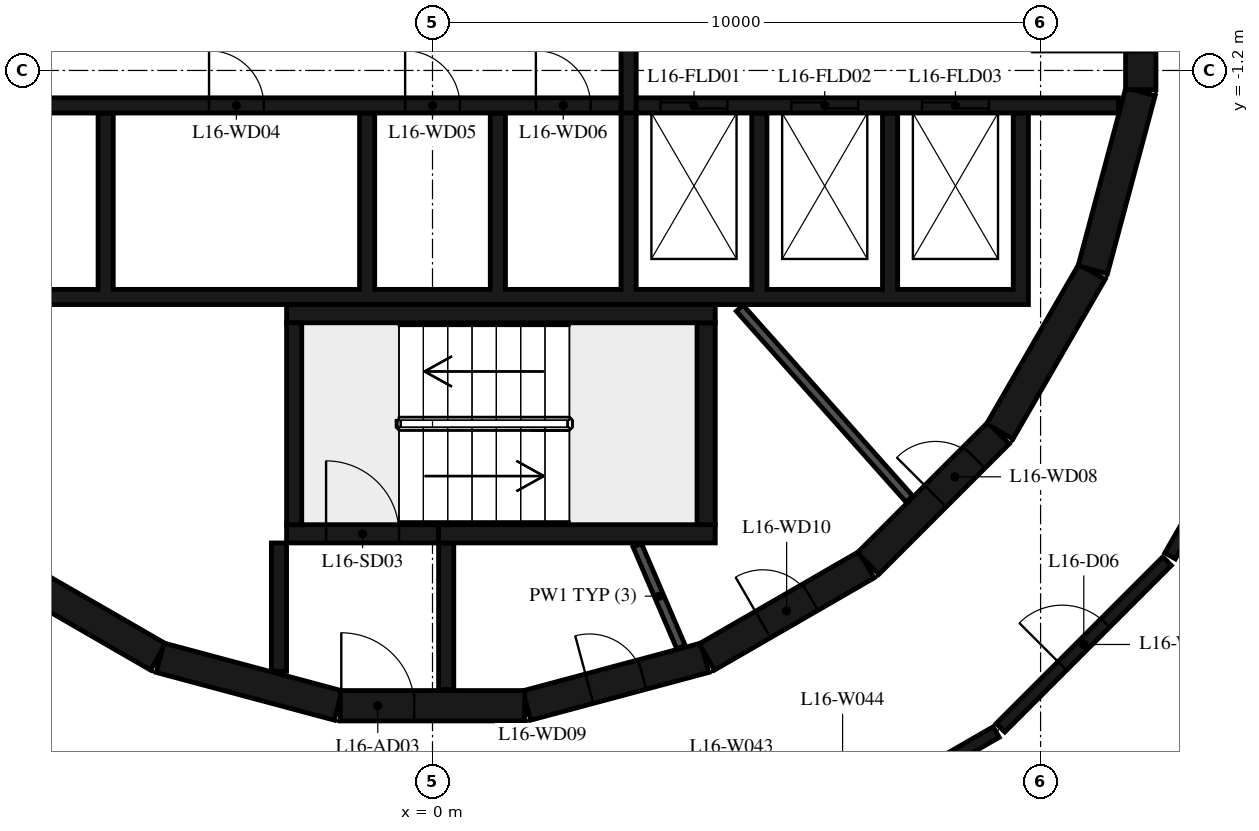
"""IFC4 building model, lengths in metres.
Left out: names, types, materials, properties, quantities, classifications, styles, units other than length and angle.
Written with IfcOpenShell. Run it as: python <this file> out.ifc"""

import sys

from ifc_helpers import new_model, si_unit, direction, frame, frame_2d, origin, place, context, subcontext, project, spatial, polyline, rectangle, outline, extrude, element, fill, save


model = new_model("IFC4")
c1 = context("Model", 3, precision=1e-05, world=origin(), true_north=direction((0.0, 1.0)))
c2 = subcontext(c1, "Body", "Model", "MODEL_VIEW")
j1 = project(units=[si_unit("LENGTHUNIT", "METRE"), si_unit("PLANEANGLEUNIT", "RADIAN")], contexts=[c1])
p1 = place(None, origin())
s1 = spatial("IfcSite", under=j1, at=p1, CompositionType="ELEMENT")
p2 = place(p1, origin())
s2 = spatial("IfcBuilding", under=s1, at=p2, CompositionType="ELEMENT")
p3 = place(p2, frame((0.0, 0.0, 69.9)))
s3 = spatial("IfcBuildingStorey", under=s2, at=p3, CompositionType="ELEMENT", Elevation=69.9)
p4 = place(p3, frame((1.55, -11.643, 0.0), z_axis=(0.0, 0.0, 1.0), x_axis=(0.965948410781, 0.258734743916, 0.0)))
e1 = element("IfcWall", 1, at=p4, inside=s3, PredefinedType="SHEAR", context=c2, shape_type="SweptSolid", body=[
    extrude(rectangle(XDim=3.033, YDim=0.5, at=frame_2d((1.516, 0.0))), origin(), (0.0, 0.0, 1.0), 6.35),
])
p5 = place(p4, frame((1.066, 0.0, 0.0)))
e2 = element("IfcOpeningElement", 2, at=p5, cuts=e1, PredefinedType="OPENING", context=c2, shape_type="SweptSolid", body=[
    extrude(rectangle(XDim=0.9, YDim=2.1, at=frame_2d((0.45, 1.05))), frame((0.0, 0.26, 0.0), z_axis=(0.0, -1.0, 0.0), x_axis=(1.0, 0.0, 0.0)), (0.0, 0.0, 1.0), 0.52),
])
p6 = place(p3, frame((4.51, -10.845, 0.0), z_axis=(0.0, 0.0, 1.0), x_axis=(0.865975092491, 0.500087131594, 0.0)))
e3 = element("IfcWall", 3, at=p6, inside=s3, PredefinedType="SHEAR", context=c2, shape_type="SweptSolid", body=[
    extrude(rectangle(XDim=3.033, YDim=0.5, at=frame_2d((1.516, 0.0))), origin(), (0.0, 0.0, 1.0), 6.35),
])
p7 = place(p6, frame((1.066, 0.0, 0.0)))
e4 = element("IfcOpeningElement", 4, at=p7, cuts=e3, PredefinedType="OPENING", context=c2, shape_type="SweptSolid", body=[
    extrude(rectangle(XDim=0.9, YDim=2.1, at=frame_2d((0.45, 1.05))), frame((0.0, 0.26, 0.0), z_axis=(0.0, -1.0, 0.0), x_axis=(1.0, 0.0, 0.0)), (0.0, 0.0, 1.0), 0.52),
])
p8 = place(p3, frame((7.164, -9.308, 0.0), z_axis=(0.0, 0.0, 1.0), x_axis=(0.707106781187, 0.707106781187, 0.0)))
e5 = element("IfcWall", 5, at=p8, inside=s3, PredefinedType="SHEAR", context=c2, shape_type="SweptSolid", body=[
    extrude(rectangle(XDim=3.032, YDim=0.5, at=frame_2d((1.516, 0.0))), origin(), (0.0, 0.0, 1.0), 6.35),
])
p9 = place(p8, frame((1.566, 0.0, 0.0)))
e6 = element("IfcOpeningElement", 6, at=p9, cuts=e5, PredefinedType="OPENING", context=c2, shape_type="SweptSolid", body=[
    extrude(rectangle(XDim=0.9, YDim=2.1, at=frame_2d((0.45, 1.05))), frame((0.0, 0.26, 0.0), z_axis=(0.0, -1.0, 0.0), x_axis=(1.0, 0.0, 0.0)), (0.0, 0.0, 1.0), 0.52),
])
for number, where, z_axis, x_axis in (
    (7, (9.329, -7.137, 0.0), (0.0, 0.0, 1.0), (0.5, 0.866, 0.0)),
    (8, (10.858, -4.479, 0.0), (0.0, 0.0, 1.0), (0.259, 0.966, 0.0)),
):
    element("IfcWall", number, at=place(p3, frame(where, z_axis=z_axis, x_axis=x_axis)), inside=s3, PredefinedType="SHEAR", context=c2, shape_type="SweptSolid", body=[
        extrude(rectangle(XDim=3.033, YDim=0.5, at=frame_2d((1.516, 0.0))), origin(), (0.0, 0.0, 1.0), 6.35),
    ])
p10 = place(p3, frame((11.647, -1.516, 0.0), z_axis=(0.0, 0.0, 1.0), x_axis=(0.0, 1.0, 0.0)))
e9 = element("IfcWall", 9, at=p10, inside=s3, PredefinedType="SHEAR", context=c2, shape_type="SweptSolid", body=[
    extrude(rectangle(XDim=3.033, YDim=0.5, at=frame_2d((1.516, 0.0))), origin(), (0.0, 0.0, 1.0), 6.35),
])
p11 = place(p10, frame((0.616, 0.0, 0.0)))
e10 = element("IfcOpeningElement", 10, at=p11, cuts=e9, PredefinedType="OPENING", context=c2, shape_type="SweptSolid", body=[
    extrude(rectangle(XDim=1.8, YDim=2.1, at=frame_2d((0.9, 1.05))), frame((0.0, 0.26, 0.0), z_axis=(0.0, -1.0, 0.0), x_axis=(1.0, 0.0, 0.0)), (0.0, 0.0, 1.0), 0.52),
])
for number, where, z_axis, x_axis in (
    (11, (-7.137, -9.329, 0.0), (0.0, 0.0, 1.0), (0.866, -0.5, 0.0)),
    (12, (-4.479, -10.858, 0.0), (0.0, 0.0, 1.0), (0.966, -0.259, 0.0)),
):
    element("IfcWall", number, at=place(p3, frame(where, z_axis=z_axis, x_axis=x_axis)), inside=s3, PredefinedType="SHEAR", context=c2, shape_type="SweptSolid", body=[
        extrude(rectangle(XDim=3.033, YDim=0.5, at=frame_2d((1.516, 0.0))), origin(), (0.0, 0.0, 1.0), 6.35),
    ])
p12 = place(p3, frame((-1.516, -11.647, 0.0), z_axis=(0.0, 0.0, 1.0), x_axis=(1.0, 0.0, 0.0)))
e13 = element("IfcWall", 13, at=p12, inside=s3, PredefinedType="SHEAR", context=c2, shape_type="SweptSolid", body=[
    extrude(rectangle(XDim=3.033, YDim=0.5, at=frame_2d((1.516, 0.0))), origin(), (0.0, 0.0, 1.0), 6.35),
])
p13 = place(p12, frame((0.016, 0.0, 0.0)))
e14 = element("IfcOpeningElement", 14, at=p13, cuts=e13, PredefinedType="OPENING", context=c2, shape_type="SweptSolid", body=[
    extrude(rectangle(XDim=1.2, YDim=2.1, at=frame_2d((0.6, 1.05))), frame((0.0, 0.26, 0.0), z_axis=(0.0, -1.0, 0.0), x_axis=(1.0, 0.0, 0.0)), (0.0, 0.0, 1.0), 0.52),
])
p14 = place(p3, frame((-2.275, -8.67, 0.0), z_axis=(0.0, 0.0, 1.0), x_axis=(0.0, 1.0, 0.0)))
e15 = element("IfcWall", 15, at=p14, inside=s3, PredefinedType="SHEAR", context=c2, shape_type="SweptSolid", body=[
    extrude(rectangle(XDim=3.32, YDim=0.25, at=frame_2d((1.66, 0.0))), origin(), (0.0, 0.0, 1.0), 6.35),
])
p15 = place(p3, frame((-2.4, -5.2, 0.0), z_axis=(0.0, 0.0, 1.0), x_axis=(1.0, 0.0, 0.0)))
e16 = element("IfcWall", 16, at=p15, inside=s3, PredefinedType="SHEAR", context=c2, shape_type="SweptSolid", body=[
    extrude(rectangle(XDim=7.05, YDim=0.3, at=frame_2d((3.525, 0.0))), origin(), (0.0, 0.0, 1.0), 6.35),
])
p16 = place(p3, frame((4.5, -8.67, 0.0), z_axis=(0.0, 0.0, 1.0), x_axis=(0.0, 1.0, 0.0)))
e17 = element("IfcWall", 17, at=p16, inside=s3, PredefinedType="SHEAR", context=c2, shape_type="SweptSolid", body=[
    extrude(rectangle(XDim=3.32, YDim=0.3, at=frame_2d((1.66, 0.0))), origin(), (0.0, 0.0, 1.0), 6.35),
])
p17 = place(p3, frame((0.1, -8.82, 0.0), z_axis=(0.0, 0.0, 1.0), x_axis=(1.0, 0.0, 0.0)))
e18 = element("IfcWall", 18, at=p17, inside=s3, PredefinedType="SHEAR", context=c2, shape_type="SweptSolid", body=[
    extrude(rectangle(XDim=4.55, YDim=0.3, at=frame_2d((2.275, 0.0))), origin(), (0.0, 0.0, 1.0), 6.35),
])
p18 = place(p3, frame((-2.4, -8.82, 0.0), z_axis=(0.0, 0.0, 1.0), x_axis=(1.0, 0.0, 0.0)))
e19 = element("IfcWall", 19, at=p18, inside=s3, PredefinedType="SHEAR", context=c2, shape_type="SweptSolid", body=[
    extrude(rectangle(XDim=2.5, YDim=0.3, at=frame_2d((1.25, 0.0))), origin(), (0.0, 0.0, 1.0), 6.35),
])
p19 = place(p18, frame((0.65, 0.0, 0.0)))
e20 = element("IfcOpeningElement", 20, at=p19, cuts=e19, PredefinedType="OPENING", context=c2, shape_type="SweptSolid", body=[
    extrude(rectangle(XDim=1.2, YDim=2.1, at=frame_2d((0.6, 1.05))), frame((0.0, 0.16, 0.0), z_axis=(0.0, -1.0, 0.0), x_axis=(1.0, 0.0, 0.0)), (0.0, 0.0, 1.0), 0.32),
])
p20 = place(p3, frame((-2.525, -8.97, 0.0), z_axis=(0.0, 0.0, 1.0), x_axis=(0.0, -1.0, 0.0)))
e21 = element("IfcWall", 21, at=p20, inside=s3, PredefinedType="SHEAR", context=c2, shape_type="SweptSolid", body=[
    extrude(rectangle(XDim=2.11, YDim=0.25, at=frame_2d((1.055, 0.0))), origin(), (0.0, 0.0, 1.0), 6.35),
])
p21 = place(p3, frame((0.225, -8.97, 0.0), z_axis=(0.0, 0.0, 1.0), x_axis=(0.0, -1.0, 0.0)))
e22 = element("IfcWall", 22, at=p21, inside=s3, PredefinedType="SHEAR", context=c2, shape_type="SweptSolid", body=[
    extrude(rectangle(XDim=2.41, YDim=0.25, at=frame_2d((1.205, 0.0))), origin(), (0.0, 0.0, 1.0), 6.35),
])
p22 = place(p3, origin())
e23 = element("IfcWall", 23, at=p22, inside=s3, PredefinedType="SHEAR", context=c2, shape_type="SweptSolid", body=[
    extrude(outline(polyline([(9.8, -5.05), (9.8, -4.8), (9.8, -1.9), (9.55, -1.9), (9.55, -4.8), (7.65, -4.8), (7.65, -1.9), (7.4, -1.9), (7.4, -4.8), (5.5, -4.8), (5.5, -1.9), (5.25, -1.9), (5.25, -4.8), (3.35, -4.8), (3.35, -1.9), (3.1, -1.9), (3.1, -4.8), (1.2, -4.8), (1.2, -1.9), (0.95, -1.9), (0.95, -4.8), (-0.95, -4.8), (-0.95, -1.9), (-1.2, -1.9), (-1.2, -4.8), (-5.25, -4.8), (-5.25, -1.9), (-5.5, -1.9), (-5.5, -4.8), (-7.4, -4.8), (-7.4, -1.9), (-7.65, -1.9), (-7.65, -4.8), (-9.55, -4.8), (-9.55, -1.9), (-9.8, -1.9), (-9.8, -4.8), (-9.8, -5.05), (9.8, -5.05)])), origin(), (0.0, 0.0, 1.0), 6.35),
])
p23 = place(p3, frame((-11.28, -1.775, 0.0), z_axis=(0.0, 0.0, 1.0), x_axis=(1.0, 0.0, 0.0)))
e24 = element("IfcWall", 24, at=p23, inside=s3, PredefinedType="SHEAR", context=c2, shape_type="SweptSolid", body=[
    extrude(rectangle(XDim=14.38, YDim=0.25, at=frame_2d((7.19, 0.0))), origin(), (0.0, 0.0, 1.0), 6.35),
])
p24 = place(p23, frame((7.605, 0.0, 0.0)))
e25 = element("IfcOpeningElement", 25, at=p24, cuts=e24, PredefinedType="OPENING", context=c2, shape_type="SweptSolid", body=[
    extrude(rectangle(XDim=0.9, YDim=2.1, at=frame_2d((0.45, 1.05))), frame((0.0, 0.135, 0.0), z_axis=(0.0, -1.0, 0.0), x_axis=(1.0, 0.0, 0.0)), (0.0, 0.0, 1.0), 0.27),
])
p25 = place(p23, frame((10.83, 0.0, 0.0)))
e26 = element("IfcOpeningElement", 26, at=p25, cuts=e24, PredefinedType="OPENING", context=c2, shape_type="SweptSolid", body=[
    extrude(rectangle(XDim=0.9, YDim=2.1, at=frame_2d((0.45, 1.05))), frame((0.0, 0.135, 0.0), z_axis=(0.0, -1.0, 0.0), x_axis=(1.0, 0.0, 0.0)), (0.0, 0.0, 1.0), 0.27),
])
p26 = place(p23, frame((12.98, 0.0, 0.0)))
e27 = element("IfcOpeningElement", 27, at=p26, cuts=e24, PredefinedType="OPENING", context=c2, shape_type="SweptSolid", body=[
    extrude(rectangle(XDim=0.9, YDim=2.1, at=frame_2d((0.45, 1.05))), frame((0.0, 0.135, 0.0), z_axis=(0.0, -1.0, 0.0), x_axis=(1.0, 0.0, 0.0)), (0.0, 0.0, 1.0), 0.27),
])
p27 = place(p3, frame((3.35, -1.775, 0.0), z_axis=(0.0, 0.0, 1.0), x_axis=(1.0, 0.0, 0.0)))
e28 = element("IfcWall", 28, at=p27, inside=s3, PredefinedType="SHEAR", context=c2, shape_type="SweptSolid", body=[
    extrude(rectangle(XDim=7.93, YDim=0.25, at=frame_2d((3.965, 0.0))), origin(), (0.0, 0.0, 1.0), 6.35),
])
p28 = place(p27, frame((0.4, 0.0, 0.0)))
e29 = element("IfcOpeningElement", 29, at=p28, cuts=e28, PredefinedType="OPENING", context=c2, shape_type="SweptSolid", body=[
    extrude(rectangle(XDim=1.1, YDim=2.4, at=frame_2d((0.55, 1.2))), frame((0.0, 0.135, 0.0), z_axis=(0.0, -1.0, 0.0), x_axis=(1.0, 0.0, 0.0)), (0.0, 0.0, 1.0), 0.27),
])
p29 = place(p27, frame((2.55, 0.0, 0.0)))
e30 = element("IfcOpeningElement", 30, at=p29, cuts=e28, PredefinedType="OPENING", context=c2, shape_type="SweptSolid", body=[
    extrude(rectangle(XDim=1.1, YDim=2.4, at=frame_2d((0.55, 1.2))), frame((0.0, 0.135, 0.0), z_axis=(0.0, -1.0, 0.0), x_axis=(1.0, 0.0, 0.0)), (0.0, 0.0, 1.0), 0.27),
])
p30 = place(p27, frame((4.7, 0.0, 0.0)))
e31 = element("IfcOpeningElement", 31, at=p30, cuts=e28, PredefinedType="OPENING", context=c2, shape_type="SweptSolid", body=[
    extrude(rectangle(XDim=1.1, YDim=2.4, at=frame_2d((0.55, 1.2))), frame((0.0, 0.135, 0.0), z_axis=(0.0, -1.0, 0.0), x_axis=(1.0, 0.0, 0.0)), (0.0, 0.0, 1.0), 0.27),
])
p31 = place(p3, frame((3.225, -1.9, 0.0), z_axis=(0.0, 0.0, 1.0), x_axis=(0.0, 1.0, 0.0)))
e32 = element("IfcWall", 32, at=p31, inside=s3, PredefinedType="SHEAR", context=c2, shape_type="SweptSolid", body=[
    extrude(rectangle(XDim=3.8, YDim=0.25, at=frame_2d((1.9, 0.0))), origin(), (0.0, 0.0, 1.0), 6.35),
])
p32 = place(p3, frame((7.842, -8.248, 0.0), z_axis=(0.0, 0.0, 1.0), x_axis=(-0.66446128181, 0.747322691329, 0.0)))
e33 = element("IfcWall", 33, at=p32, inside=s3, PredefinedType="PARTITIONING", context=c2, shape_type="SweptSolid", body=[
    extrude(rectangle(XDim=4.198, YDim=0.15, at=frame_2d((2.099, 0.0))), origin(), (0.0, 0.0, 1.0), 6.35),
])
p33 = place(p3, frame((3.367, -9.007, 0.0), z_axis=(0.0, 0.0, 1.0), x_axis=(0.394387482265, -0.918944238696, 0.0)))
e34 = element("IfcWall", 34, at=p33, inside=s3, PredefinedType="PARTITIONING", context=c2, shape_type="SweptSolid", body=[
    extrude(rectangle(XDim=1.825, YDim=0.15, at=frame_2d((0.913, 0.0))), origin(), (0.0, 0.0, 1.0), 6.35),
])
p34 = place(p3, frame((7.658, -13.008, 0.0), z_axis=(0.0, 0.0, 1.0), x_axis=(0.86671190811, 0.498809049979, 0.0)))
e35 = element("IfcWall", 35, at=p34, inside=s3, PredefinedType="PARTITIONING", context=c2, shape_type="SweptSolid", body=[
    extrude(rectangle(XDim=1.859, YDim=0.2, at=frame_2d((0.93, 0.0))), origin(), (0.0, 0.0, 1.0), 6.35),
])
p35 = place(p3, frame((9.341, -12.009, 0.0), z_axis=(0.0, 0.0, 1.0), x_axis=(0.707106781187, 0.707106781187, 0.0)))
e36 = element("IfcWall", 36, at=p35, inside=s3, PredefinedType="PARTITIONING", context=c2, shape_type="SweptSolid", body=[
    extrude(rectangle(XDim=3.874, YDim=0.2, at=frame_2d((1.937, 0.0))), origin(), (0.0, 0.0, 1.0), 6.35),
])
p36 = place(p35, frame((1.437, 0.0, 0.0)))
e37 = element("IfcOpeningElement", 37, at=p36, cuts=e36, PredefinedType="OPENING", context=c2, shape_type="SweptSolid", body=[
    extrude(rectangle(XDim=1.0, YDim=2.1, at=frame_2d((0.5, 1.05))), frame((0.0, 0.11, 0.0), z_axis=(0.0, -1.0, 0.0), x_axis=(1.0, 0.0, 0.0)), (0.0, 0.0, 1.0), 0.22),
])
p37 = place(p3, frame((12.13, -9.183, 0.0), z_axis=(0.0, 0.0, 1.0), x_axis=(0.498168116644, 0.867080461987, 0.0)))
e38 = element("IfcWall", 38, at=p37, inside=s3, PredefinedType="PARTITIONING", context=c2, shape_type="SweptSolid", body=[
    extrude(rectangle(XDim=0.984, YDim=0.2, at=frame_2d((0.492, 0.0))), origin(), (0.0, 0.0, 1.0), 6.35),
])
p38 = place(p19, origin())
e39 = element("IfcDoor", 39, at=p38, inside=s3, OperationType="SINGLE_SWING_LEFT", PredefinedType="DOOR", context=c2, shape_type="SweptSolid", body=[
    extrude(rectangle(XDim=1.2, YDim=2.1, at=frame_2d((0.6, 1.05))), frame((0.0, 0.025, 0.0), z_axis=(0.0, -1.0, 0.0), x_axis=(1.0, 0.0, 0.0)), (0.0, 0.0, 1.0), 0.05),
])
fill(e20, e39)
p39 = place(p13, origin())
e40 = element("IfcDoor", 40, at=p39, inside=s3, OperationType="SINGLE_SWING_RIGHT", PredefinedType="DOOR", context=c2, shape_type="SweptSolid", body=[
    extrude(rectangle(XDim=1.2, YDim=2.1, at=frame_2d((0.6, 1.05))), frame((0.0, 0.025, 0.0), z_axis=(0.0, -1.0, 0.0), x_axis=(1.0, 0.0, 0.0)), (0.0, 0.0, 1.0), 0.05),
])
fill(e14, e40)
p40 = place(p11, origin())
e41 = element("IfcDoor", 41, at=p40, inside=s3, OperationType="DOUBLE_DOOR_SINGLE_SWING", PredefinedType="DOOR", context=c2, shape_type="SweptSolid", body=[
    extrude(rectangle(XDim=1.8, YDim=2.1, at=frame_2d((0.9, 1.05))), frame((0.0, 0.025, 0.0), z_axis=(0.0, -1.0, 0.0), x_axis=(1.0, 0.0, 0.0)), (0.0, 0.0, 1.0), 0.05),
])
fill(e10, e41)
p41 = place(p28, origin())
e42 = element("IfcDoor", 42, at=p41, inside=s3, OperationType="DOUBLE_DOOR_SLIDING", PredefinedType="DOOR", context=c2, shape_type="SweptSolid", body=[
    extrude(rectangle(XDim=1.1, YDim=2.4, at=frame_2d((0.55, 1.2))), frame((0.0, 0.025, 0.0), z_axis=(0.0, -1.0, 0.0), x_axis=(1.0, 0.0, 0.0)), (0.0, 0.0, 1.0), 0.05),
])
fill(e29, e42)
p42 = place(p29, origin())
e43 = element("IfcDoor", 43, at=p42, inside=s3, OperationType="DOUBLE_DOOR_SLIDING", PredefinedType="DOOR", context=c2, shape_type="SweptSolid", body=[
    extrude(rectangle(XDim=1.1, YDim=2.4, at=frame_2d((0.55, 1.2))), frame((0.0, 0.025, 0.0), z_axis=(0.0, -1.0, 0.0), x_axis=(1.0, 0.0, 0.0)), (0.0, 0.0, 1.0), 0.05),
])
fill(e30, e43)
p43 = place(p30, origin())
e44 = element("IfcDoor", 44, at=p43, inside=s3, OperationType="DOUBLE_DOOR_SLIDING", PredefinedType="DOOR", context=c2, shape_type="SweptSolid", body=[
    extrude(rectangle(XDim=1.1, YDim=2.4, at=frame_2d((0.55, 1.2))), frame((0.0, 0.025, 0.0), z_axis=(0.0, -1.0, 0.0), x_axis=(1.0, 0.0, 0.0)), (0.0, 0.0, 1.0), 0.05),
])
fill(e31, e44)
p44 = place(p24, origin())
e45 = element("IfcDoor", 45, at=p44, inside=s3, OperationType="SINGLE_SWING_LEFT", PredefinedType="DOOR", context=c2, shape_type="SweptSolid", body=[
    extrude(rectangle(XDim=0.9, YDim=2.1, at=frame_2d((0.45, 1.05))), frame((0.0, 0.025, 0.0), z_axis=(0.0, -1.0, 0.0), x_axis=(1.0, 0.0, 0.0)), (0.0, 0.0, 1.0), 0.05),
])
fill(e25, e45)
p45 = place(p25, origin())
e46 = element("IfcDoor", 46, at=p45, inside=s3, OperationType="SINGLE_SWING_RIGHT", PredefinedType="DOOR", context=c2, shape_type="SweptSolid", body=[
    extrude(rectangle(XDim=0.9, YDim=2.1, at=frame_2d((0.45, 1.05))), frame((0.0, 0.025, 0.0), z_axis=(0.0, -1.0, 0.0), x_axis=(1.0, 0.0, 0.0)), (0.0, 0.0, 1.0), 0.05),
])
fill(e26, e46)
p46 = place(p26, origin())
e47 = element("IfcDoor", 47, at=p46, inside=s3, OperationType="SINGLE_SWING_LEFT", PredefinedType="DOOR", context=c2, shape_type="SweptSolid", body=[
    extrude(rectangle(XDim=0.9, YDim=2.1, at=frame_2d((0.45, 1.05))), frame((0.0, 0.025, 0.0), z_axis=(0.0, -1.0, 0.0), x_axis=(1.0, 0.0, 0.0)), (0.0, 0.0, 1.0), 0.05),
])
fill(e27, e47)
p47 = place(p9, origin())
e48 = element("IfcDoor", 48, at=p47, inside=s3, OperationType="SINGLE_SWING_LEFT", PredefinedType="DOOR", context=c2, shape_type="SweptSolid", body=[
    extrude(rectangle(XDim=0.9, YDim=2.1, at=frame_2d((0.45, 1.05))), frame((0.0, 0.025, 0.0), z_axis=(0.0, -1.0, 0.0), x_axis=(1.0, 0.0, 0.0)), (0.0, 0.0, 1.0), 0.05),
])
fill(e6, e48)
p48 = place(p5, origin())
e49 = element("IfcDoor", 49, at=p48, inside=s3, OperationType="SINGLE_SWING_RIGHT", PredefinedType="DOOR", context=c2, shape_type="SweptSolid", body=[
    extrude(rectangle(XDim=0.9, YDim=2.1, at=frame_2d((0.45, 1.05))), frame((0.0, 0.025, 0.0), z_axis=(0.0, -1.0, 0.0), x_axis=(1.0, 0.0, 0.0)), (0.0, 0.0, 1.0), 0.05),
])
fill(e2, e49)
p49 = place(p7, origin())
e50 = element("IfcDoor", 50, at=p49, inside=s3, OperationType="SINGLE_SWING_LEFT", PredefinedType="DOOR", context=c2, shape_type="SweptSolid", body=[
    extrude(rectangle(XDim=0.9, YDim=2.1, at=frame_2d((0.45, 1.05))), frame((0.0, 0.025, 0.0), z_axis=(0.0, -1.0, 0.0), x_axis=(1.0, 0.0, 0.0)), (0.0, 0.0, 1.0), 0.05),
])
fill(e4, e50)
p50 = place(p36, origin())
e51 = element("IfcDoor", 51, at=p50, inside=s3, OperationType="SINGLE_SWING_LEFT", PredefinedType="DOOR", context=c2, shape_type="SweptSolid", body=[
    extrude(rectangle(XDim=1.0, YDim=2.1, at=frame_2d((0.5, 1.05))), frame((0.0, 0.025, 0.0), z_axis=(0.0, -1.0, 0.0), x_axis=(1.0, 0.0, 0.0)), (0.0, 0.0, 1.0), 0.05),
])
fill(e37, e51)
save(model, sys.argv[1])
